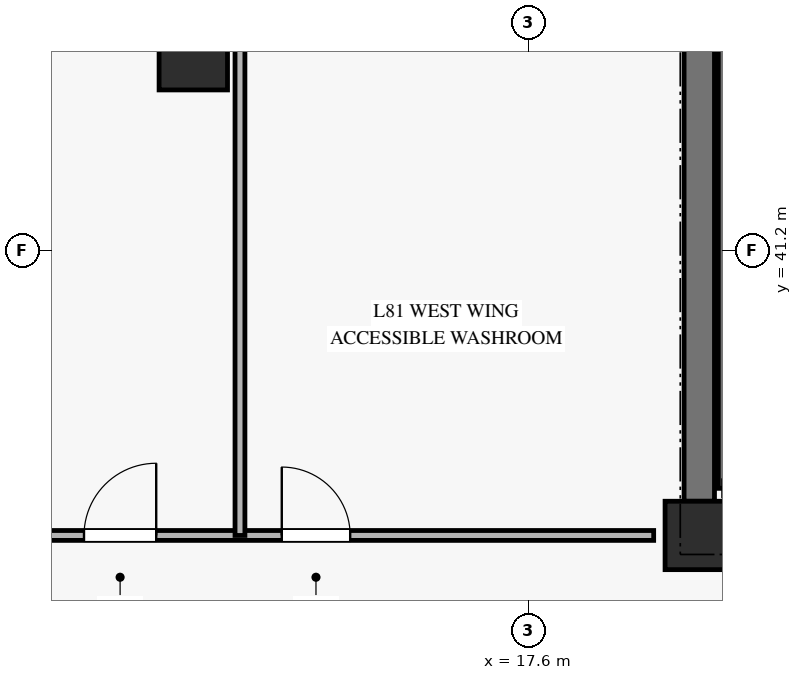
"""IFC4 building model, lengths in metres.
Left out: names, types, materials, properties, quantities, classifications, styles, units other than length and angle.
Written with IfcOpenShell. Run it as: python <this file> out.ifc"""

import sys

from ifc_helpers import new_model, si_unit, direction, frame, frame_2d, origin, origin_2d, place, context, subcontext, project, spatial, rectangle, hollow_rectangle, extrude, source, transform, mapped, element, fill, save


model = new_model("IFC4")
c1 = context("Model", 3, precision=1e-05, world=origin(), true_north=direction((0.0, 1.0)))
c2 = subcontext(c1, "Body", "Model", "MODEL_VIEW")
j1 = project(units=[si_unit("LENGTHUNIT", "METRE"), si_unit("PLANEANGLEUNIT", "RADIAN")], contexts=[c1])
p1 = place(None, origin())
s1 = spatial("IfcSite", under=j1, at=p1, CompositionType="ELEMENT")
p2 = place(p1, origin())
s2 = spatial("IfcBuilding", under=s1, at=p2, CompositionType="ELEMENT")
p3 = place(p2, frame((0.0, 0.0, 314.2)))
s3 = spatial("IfcBuildingStorey", under=s2, at=p3, CompositionType="ELEMENT", Elevation=314.2)
m1 = source(origin(), c2, "Body", "SweptSolid", [
    extrude(rectangle(XDim=0.9, YDim=0.9, at=origin_2d()), origin(), (0.0, 0.0, 1.0), 3.185),
])
p4 = place(p3, frame((19.85, 37.45, 0.0), z_axis=(0.0, 0.0, 1.0), x_axis=(1.0, 0.0, 0.0)))
e1 = element("IfcColumn", 1, at=p4, inside=s3, PredefinedType="PILASTER", context=c2, shape_type="MappedRepresentation", body=[
    mapped(m1, transform((0.0, 0.0, 0.0), x_axis=(1.0, 0.0, 0.0), y_axis=(0.0, 1.0, 0.0), z_axis=(0.0, 0.0, 1.0), scale=1.0)),
])
p5 = place(p3, frame((19.85, 37.9, 0.0), z_axis=(0.0, 0.0, 1.0), x_axis=(0.0, 1.0, 0.0)))
e2 = element("IfcWall", 2, at=p5, inside=s3, PredefinedType="SHEAR", context=c2, shape_type="SweptSolid", body=[
    extrude(rectangle(XDim=8.2, YDim=0.4, at=frame_2d((4.1, 0.0))), origin(), (0.0, 0.0, 1.0), 3.185),
])
m2 = source(origin(), c2, "Body", "SweptSolid", [
    extrude(hollow_rectangle(XDim=0.9, YDim=0.9, WallThickness=0.04, at=origin_2d()), origin(), (0.0, 0.0, 1.0), 3.185),
])
p6 = place(p3, frame((13.193, 43.762, 0.0), z_axis=(0.0, 0.0, 1.0), x_axis=(1.0, 0.0, 0.0)))
e3 = element("IfcColumn", 3, at=p6, inside=s3, PredefinedType="COLUMN", context=c2, shape_type="MappedRepresentation", body=[
    mapped(m2, transform((0.0, 0.0, 0.0), x_axis=(1.0, 0.0, 0.0), y_axis=(0.0, 1.0, 0.0), z_axis=(0.0, 0.0, 1.0), scale=1.0)),
])
p7 = place(p3, frame((12.993, 46.25, 0.0), z_axis=(0.0, 0.0, 1.0), x_axis=(-0.65172861611, -0.758452246977, 0.0)))
e4 = element("IfcWall", 4, at=p7, inside=s3, PredefinedType="SOLIDWALL", context=c2, shape_type="SweptSolid", body=[
    extrude(rectangle(XDim=3.281, YDim=0.3, at=frame_2d((1.64, 0.0))), origin(), (0.0, 0.0, 1.0), 2.815),
])
p8 = place(p7, frame((0.84, 0.0, 0.45)))
e5 = element("IfcOpeningElement", 5, at=p8, cuts=e4, PredefinedType="OPENING", context=c2, shape_type="SweptSolid", body=[
    extrude(rectangle(XDim=1.6, YDim=2.0, at=frame_2d((0.8, 1.0))), frame((0.0, 0.16, 0.0), z_axis=(0.0, -1.0, 0.0), x_axis=(1.0, 0.0, 0.0)), (0.0, 0.0, 1.0), 0.32),
])
p9 = place(p3, frame((20.17, 38.07, 0.0), z_axis=(0.0, 0.0, 1.0), x_axis=(0.0, 1.0, 0.0)))
e6 = element("IfcWall", 6, at=p9, inside=s3, PredefinedType="SOLIDWALL", context=c2, shape_type="SweptSolid", body=[
    extrude(rectangle(XDim=7.25, YDim=0.14, at=frame_2d((3.625, 0.0))), origin(), (0.0, 0.0, 1.0), 3.4),
])
p10 = place(p3, frame((10.855, 37.45, 0.0), z_axis=(0.0, 0.0, 1.0), x_axis=(1.0, 0.0, 0.0)))
e7 = element("IfcWall", 7, at=p10, inside=s3, PredefinedType="PARTITIONING", context=c2, shape_type="SweptSolid", body=[
    extrude(rectangle(XDim=8.395, YDim=0.13, at=frame_2d((4.198, 0.0))), origin(), (0.0, 0.0, 1.0), 2.82),
])
p11 = place(p10, frame((0.9, 0.0, 0.0)))
e8 = element("IfcOpeningElement", 8, at=p11, cuts=e7, PredefinedType="OPENING", context=c2, shape_type="SweptSolid", body=[
    extrude(rectangle(XDim=0.95, YDim=2.1, at=frame_2d((0.475, 1.05))), frame((0.0, 0.075, 0.0), z_axis=(0.0, -1.0, 0.0), x_axis=(1.0, 0.0, 0.0)), (0.0, 0.0, 1.0), 0.15),
])
p12 = place(p10, frame((3.502, 0.0, 0.0)))
e9 = element("IfcOpeningElement", 9, at=p12, cuts=e7, PredefinedType="OPENING", context=c2, shape_type="SweptSolid", body=[
    extrude(rectangle(XDim=0.9, YDim=2.1, at=frame_2d((0.45, 1.05))), frame((0.0, 0.075, 0.0), z_axis=(0.0, -1.0, 0.0), x_axis=(1.0, 0.0, 0.0)), (0.0, 0.0, 1.0), 0.15),
])
p13 = place(p3, frame((13.807, 37.45, 0.0), z_axis=(0.0, 0.0, 1.0), x_axis=(0.0, 1.0, 0.0)))
e10 = element("IfcWall", 10, at=p13, inside=s3, PredefinedType="PARTITIONING", context=c2, shape_type="SweptSolid", body=[
    extrude(rectangle(XDim=8.8, YDim=0.13, at=frame_2d((4.4, 0.0))), origin(), (0.0, 0.0, 1.0), 3.185),
])
m3 = source(origin(), c2, "Body", "SweptSolid", [
    extrude(rectangle(XDim=0.95, YDim=2.1, at=frame_2d((0.475, 1.05))), frame((0.0, 0.025, 0.0), z_axis=(0.0, -1.0, 0.0), x_axis=(1.0, 0.0, 0.0)), (0.0, 0.0, 1.0), 0.05),
])
p14 = place(p11, origin())
e11 = element("IfcDoor", 11, at=p14, inside=s3, OperationType="SINGLE_SWING_RIGHT", PredefinedType="DOOR", context=c2, shape_type="MappedRepresentation", body=[
    mapped(m3, transform((0.0, 0.0, 0.0), x_axis=(1.0, 0.0, 0.0), y_axis=(0.0, 1.0, 0.0), z_axis=(0.0, 0.0, 1.0), scale=1.0)),
])
fill(e8, e11)
m4 = source(origin(), c2, "Body", "SweptSolid", [
    extrude(rectangle(XDim=0.9, YDim=2.1, at=frame_2d((0.45, 1.05))), frame((0.0, 0.025, 0.0), z_axis=(0.0, -1.0, 0.0), x_axis=(1.0, 0.0, 0.0)), (0.0, 0.0, 1.0), 0.05),
])
p15 = place(p12, origin())
e12 = element("IfcDoor", 12, at=p15, inside=s3, OperationType="SINGLE_SWING_LEFT", PredefinedType="DOOR", context=c2, shape_type="MappedRepresentation", body=[
    mapped(m4, transform((0.0, 0.0, 0.0), x_axis=(1.0, 0.0, 0.0), y_axis=(0.0, 1.0, 0.0), z_axis=(0.0, 0.0, 1.0), scale=1.0)),
])
fill(e9, e12)
save(model, sys.argv[1])
